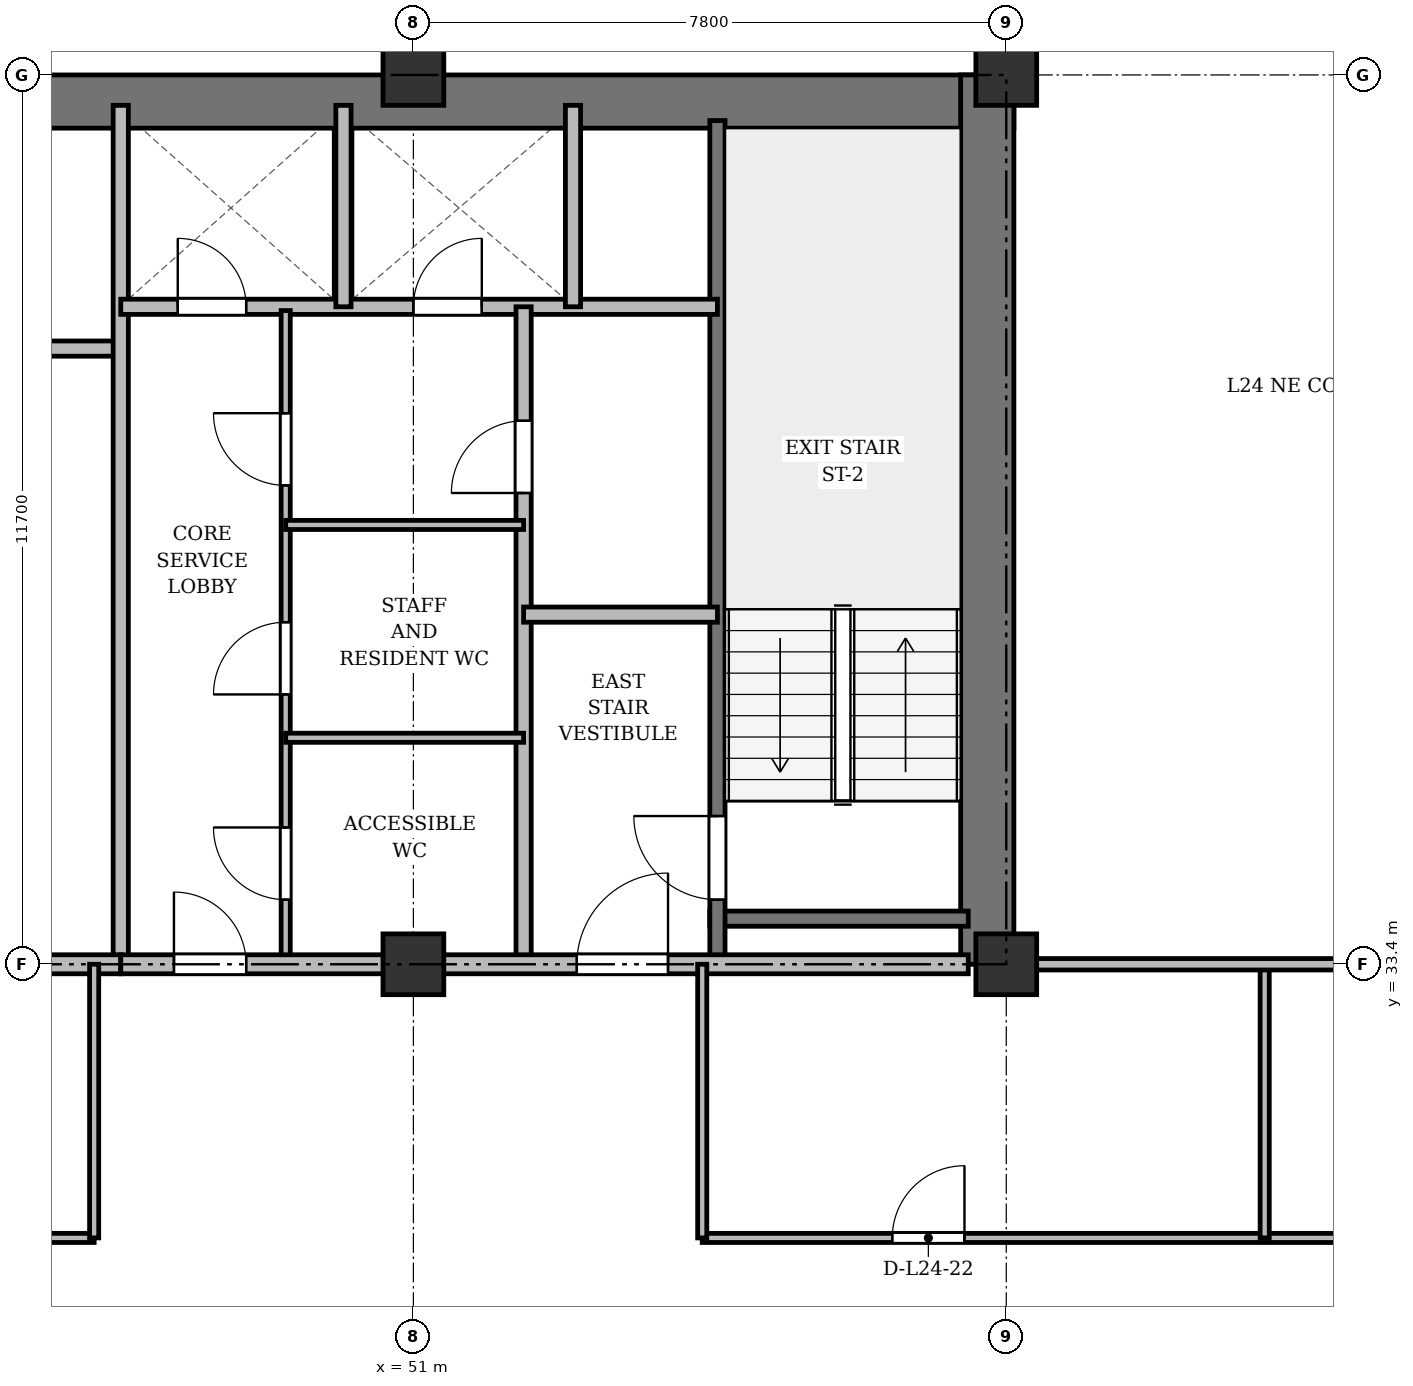
"""IFC4 building model, lengths in metres.
Left out: names, types, materials, properties, quantities, classifications, styles, units other than length and angle.
Written with IfcOpenShell. Run it as: python <this file> out.ifc"""

import sys

from ifc_helpers import new_model, si_unit, direction, frame, frame_2d, origin, origin_2d, place, context, subcontext, project, spatial, rectangle, extrude, source, transform, mapped, element, fill, save


model = new_model("IFC4")
c1 = context("Model", 3, precision=1e-05, world=origin(), true_north=direction((0.0, 1.0)))
c2 = subcontext(c1, "Body", "Model", "MODEL_VIEW")
j1 = project(units=[si_unit("LENGTHUNIT", "METRE"), si_unit("PLANEANGLEUNIT", "RADIAN")], contexts=[c1])
p1 = place(None, origin())
s1 = spatial("IfcSite", under=j1, at=p1, CompositionType="ELEMENT")
p2 = place(p1, origin())
s2 = spatial("IfcBuilding", under=s1, at=p2, CompositionType="ELEMENT")
p3 = place(p2, frame((0.0, 0.0, 96.1)))
s3 = spatial("IfcBuildingStorey", under=s2, at=p3, CompositionType="ELEMENT", Elevation=96.1)
m1 = source(origin(), c2, "Body", "SweptSolid", [
    extrude(rectangle(XDim=0.8, YDim=0.8, at=origin_2d()), origin(), (0.0, 0.0, 1.0), 3.6),
])
for number, where, z_axis, x_axis in (
    (1, (51.0, 33.4, 0.0), (0.0, 0.0, 1.0), (1.0, 0.0, 0.0)),
    (2, (51.0, 45.1, 0.0), (0.0, 0.0, 1.0), (1.0, 0.0, 0.0)),
    (3, (58.8, 33.4, 0.0), (0.0, 0.0, 1.0), (1.0, 0.0, 0.0)),
    (4, (58.8, 45.1, 0.0), (0.0, 0.0, 1.0), (1.0, 0.0, 0.0)),
):
    element("IfcColumn", number, at=place(p3, frame(where, z_axis=z_axis, x_axis=x_axis)), inside=s3, PredefinedType="COLUMN", context=c2, shape_type="MappedRepresentation", body=[
        mapped(m1, transform((0.0, 0.0, 0.0), x_axis=(1.0, 0.0, 0.0), y_axis=(0.0, 1.0, 0.0), z_axis=(0.0, 0.0, 1.0), scale=1.0)),
    ])
p4 = place(p3, frame((15.5, 44.75, 0.0), z_axis=(0.0, 0.0, 1.0), x_axis=(1.0, 0.0, 0.0)))
e5 = element("IfcWall", 5, at=p4, inside=s3, PredefinedType="SHEAR", context=c2, shape_type="SweptSolid", body=[
    extrude(rectangle(XDim=43.4, YDim=0.7, at=frame_2d((21.7, 0.0))), origin(), (0.0, 0.0, 1.0), 3.34),
])
p5 = place(p3, frame((58.55, 33.4, 0.0), z_axis=(0.0, 0.0, 1.0), x_axis=(0.0, 1.0, 0.0)))
e6 = element("IfcWall", 6, at=p5, inside=s3, PredefinedType="SHEAR", context=c2, shape_type="SweptSolid", body=[
    extrude(rectangle(XDim=11.7, YDim=0.7, at=frame_2d((5.85, 0.0))), origin(), (0.0, 0.0, 1.0), 3.34),
])
p6 = place(p3, frame((54.9, 34.0, 0.0), z_axis=(0.0, 0.0, 1.0), x_axis=(1.0, 0.0, 0.0)))
e7 = element("IfcWall", 7, at=p6, inside=s3, PredefinedType="SHEAR", context=c2, shape_type="SweptSolid", body=[
    extrude(rectangle(XDim=3.4, YDim=0.2, at=frame_2d((1.7, 0.0))), origin(), (0.0, 0.0, 1.0), 3.34),
])
p7 = place(p3, frame((55.0, 33.4, 0.0), z_axis=(0.0, 0.0, 1.0), x_axis=(0.0, 1.0, 0.0)))
e8 = element("IfcWall", 8, at=p7, inside=s3, PredefinedType="SHEAR", context=c2, shape_type="SweptSolid", body=[
    extrude(rectangle(XDim=11.1, YDim=0.2, at=frame_2d((5.55, 0.0))), origin(), (0.0, 0.0, 1.0), 3.34),
])
p8 = place(p7, frame((0.85, 0.0, 0.0)))
e9 = element("IfcOpeningElement", 9, at=p8, cuts=e8, PredefinedType="OPENING", context=c2, shape_type="SweptSolid", body=[
    extrude(rectangle(XDim=1.1, YDim=2.15, at=frame_2d((0.55, 1.075))), frame((0.0, 0.11, 0.0), z_axis=(0.0, -1.0, 0.0), x_axis=(1.0, 0.0, 0.0)), (0.0, 0.0, 1.0), 0.22),
])
p9 = place(p3, frame((40.25, 41.5, 0.0), z_axis=(0.0, 0.0, 1.0), x_axis=(1.0, 0.0, 0.0)))
e10 = element("IfcWall", 10, at=p9, inside=s3, PredefinedType="SOLIDWALL", context=c2, shape_type="SweptSolid", body=[
    extrude(rectangle(XDim=6.9, YDim=0.2, at=frame_2d((3.45, 0.0))), origin(), (0.0, 0.0, 1.0), 2.84),
])
p10 = place(p3, frame((47.15, 33.4, 0.0), z_axis=(0.0, 0.0, 1.0), x_axis=(0.0, 1.0, 0.0)))
e11 = element("IfcWall", 11, at=p10, inside=s3, PredefinedType="SOLIDWALL", context=c2, shape_type="SweptSolid", body=[
    extrude(rectangle(XDim=11.3, YDim=0.2, at=frame_2d((5.65, 0.0))), origin(), (0.0, 0.0, 1.0), 2.752),
])
p11 = place(p3, frame((26.3, 33.4, 0.0), z_axis=(0.0, 0.0, 1.0), x_axis=(1.0, 0.0, 0.0)))
e12 = element("IfcWall", 12, at=p11, inside=s3, PredefinedType="PARTITIONING", context=c2, shape_type="SweptSolid", body=[
    extrude(rectangle(XDim=20.85, YDim=0.25, at=frame_2d((10.425, 0.0))), origin(), (0.0, 0.0, 1.0), 2.752),
])
p12 = place(p11, frame((9.2, 0.0, 0.0)))
e13 = element("IfcOpeningElement", 13, at=p12, cuts=e12, PredefinedType="OPENING", context=c2, shape_type="SweptSolid", body=[
    extrude(rectangle(XDim=1.6, YDim=2.2, at=frame_2d((0.8, 1.1))), frame((0.0, 0.135, 0.0), z_axis=(0.0, -1.0, 0.0), x_axis=(1.0, 0.0, 0.0)), (0.0, 0.0, 1.0), 0.27),
])
p13 = place(p3, frame((47.15, 42.05, 0.0), z_axis=(0.0, 0.0, 1.0), x_axis=(1.0, 0.0, 0.0)))
e14 = element("IfcWall", 14, at=p13, inside=s3, PredefinedType="SOLIDWALL", context=c2, shape_type="SweptSolid", body=[
    extrude(rectangle(XDim=7.85, YDim=0.2, at=frame_2d((3.925, 0.0))), origin(), (0.0, 0.0, 1.0), 2.84),
])
p14 = place(p13, frame((0.75, 0.0, 0.0)))
e15 = element("IfcOpeningElement", 15, at=p14, cuts=e14, PredefinedType="OPENING", context=c2, shape_type="SweptSolid", body=[
    extrude(rectangle(XDim=0.9, YDim=2.1, at=frame_2d((0.45, 1.05))), frame((0.0, 0.11, 0.0), z_axis=(0.0, -1.0, 0.0), x_axis=(1.0, 0.0, 0.0)), (0.0, 0.0, 1.0), 0.22),
])
p15 = place(p13, frame((3.85, 0.0, 0.0)))
e16 = element("IfcOpeningElement", 16, at=p15, cuts=e14, PredefinedType="OPENING", context=c2, shape_type="SweptSolid", body=[
    extrude(rectangle(XDim=0.9, YDim=2.1, at=frame_2d((0.45, 1.05))), frame((0.0, 0.11, 0.0), z_axis=(0.0, -1.0, 0.0), x_axis=(1.0, 0.0, 0.0)), (0.0, 0.0, 1.0), 0.22),
])
for number, where, z_axis, x_axis in (
    (17, (50.08, 42.05, 0.0), (0.0, 0.0, 1.0), (0.0, 1.0, 0.0)),
    (18, (53.1, 42.05, 0.0), (0.0, 0.0, 1.0), (0.0, 1.0, 0.0)),
):
    element("IfcWall", number, at=place(p3, frame(where, z_axis=z_axis, x_axis=x_axis)), inside=s3, PredefinedType="SOLIDWALL", context=c2, shape_type="SweptSolid", body=[
        extrude(rectangle(XDim=2.65, YDim=0.2, at=frame_2d((1.325, 0.0))), origin(), (0.0, 0.0, 1.0), 3.34),
    ])
p16 = place(p3, frame((52.45, 33.4, 0.0), z_axis=(0.0, 0.0, 1.0), x_axis=(0.0, 1.0, 0.0)))
e19 = element("IfcWall", 19, at=p16, inside=s3, PredefinedType="PARTITIONING", context=c2, shape_type="SweptSolid", body=[
    extrude(rectangle(XDim=8.65, YDim=0.2, at=frame_2d((4.325, 0.0))), origin(), (0.0, 0.0, 1.0), 2.752),
])
p17 = place(p16, frame((6.2, 0.0, 0.0)))
e20 = element("IfcOpeningElement", 20, at=p17, cuts=e19, PredefinedType="OPENING", context=c2, shape_type="SweptSolid", body=[
    extrude(rectangle(XDim=0.95, YDim=2.15, at=frame_2d((0.475, 1.075))), frame((0.0, 0.11, 0.0), z_axis=(0.0, -1.0, 0.0), x_axis=(1.0, 0.0, 0.0)), (0.0, 0.0, 1.0), 0.22),
])
p18 = place(p3, frame((52.45, 38.0, 0.0), z_axis=(0.0, 0.0, 1.0), x_axis=(1.0, 0.0, 0.0)))
e21 = element("IfcWall", 21, at=p18, inside=s3, PredefinedType="PARTITIONING", context=c2, shape_type="SweptSolid", body=[
    extrude(rectangle(XDim=2.55, YDim=0.2, at=frame_2d((1.275, 0.0))), origin(), (0.0, 0.0, 1.0), 3.34),
])
p19 = place(p3, frame((49.32, 33.4, 0.0), z_axis=(0.0, 0.0, 1.0), x_axis=(0.0, 1.0, 0.0)))
e22 = element("IfcWall", 22, at=p19, inside=s3, PredefinedType="PARTITIONING", context=c2, shape_type="SweptSolid", body=[
    extrude(rectangle(XDim=8.6, YDim=0.12, at=frame_2d((4.3, 0.0))), origin(), (0.0, 0.0, 1.0), 2.752),
])
p20 = place(p19, frame((0.85, 0.0, 0.0)))
e23 = element("IfcOpeningElement", 23, at=p20, cuts=e22, PredefinedType="OPENING", context=c2, shape_type="SweptSolid", body=[
    extrude(rectangle(XDim=0.95, YDim=2.15, at=frame_2d((0.475, 1.075))), frame((0.0, 0.07, 0.0), z_axis=(0.0, -1.0, 0.0), x_axis=(1.0, 0.0, 0.0)), (0.0, 0.0, 1.0), 0.14),
])
p21 = place(p19, frame((3.55, 0.0, 0.0)))
e24 = element("IfcOpeningElement", 24, at=p21, cuts=e22, PredefinedType="OPENING", context=c2, shape_type="SweptSolid", body=[
    extrude(rectangle(XDim=0.95, YDim=2.15, at=frame_2d((0.475, 1.075))), frame((0.0, 0.07, 0.0), z_axis=(0.0, -1.0, 0.0), x_axis=(1.0, 0.0, 0.0)), (0.0, 0.0, 1.0), 0.14),
])
p22 = place(p19, frame((6.3, 0.0, 0.0)))
e25 = element("IfcOpeningElement", 25, at=p22, cuts=e22, PredefinedType="OPENING", context=c2, shape_type="SweptSolid", body=[
    extrude(rectangle(XDim=0.95, YDim=2.15, at=frame_2d((0.475, 1.075))), frame((0.0, 0.07, 0.0), z_axis=(0.0, -1.0, 0.0), x_axis=(1.0, 0.0, 0.0)), (0.0, 0.0, 1.0), 0.14),
])
for number, where, z_axis, x_axis in (
    (26, (49.32, 36.38, 0.0), (0.0, 0.0, 1.0), (1.0, 0.0, 0.0)),
    (27, (49.32, 39.18, 0.0), (0.0, 0.0, 1.0), (1.0, 0.0, 0.0)),
):
    element("IfcWall", number, at=place(p3, frame(where, z_axis=z_axis, x_axis=x_axis)), inside=s3, PredefinedType="PARTITIONING", context=c2, shape_type="SweptSolid", body=[
        extrude(rectangle(XDim=3.13, YDim=0.12, at=frame_2d((1.565, 0.0))), origin(), (0.0, 0.0, 1.0), 2.84),
    ])
p23 = place(p3, frame((47.15, 33.4, 0.0), z_axis=(0.0, 0.0, 1.0), x_axis=(1.0, 0.0, 0.0)))
e28 = element("IfcWall", 28, at=p23, inside=s3, PredefinedType="PARTITIONING", context=c2, shape_type="SweptSolid", body=[
    extrude(rectangle(XDim=11.15, YDim=0.25, at=frame_2d((5.575, 0.0))), origin(), (0.0, 0.0, 1.0), 2.752),
])
p24 = place(p23, frame((0.7, 0.0, 0.0)))
e29 = element("IfcOpeningElement", 29, at=p24, cuts=e28, PredefinedType="OPENING", context=c2, shape_type="SweptSolid", body=[
    extrude(rectangle(XDim=0.95, YDim=2.15, at=frame_2d((0.475, 1.075))), frame((0.0, 0.135, 0.0), z_axis=(0.0, -1.0, 0.0), x_axis=(1.0, 0.0, 0.0)), (0.0, 0.0, 1.0), 0.27),
])
p25 = place(p23, frame((6.0, 0.0, 0.0)))
e30 = element("IfcOpeningElement", 30, at=p25, cuts=e28, PredefinedType="OPENING", context=c2, shape_type="SweptSolid", body=[
    extrude(rectangle(XDim=1.2, YDim=2.15, at=frame_2d((0.6, 1.075))), frame((0.0, 0.135, 0.0), z_axis=(0.0, -1.0, 0.0), x_axis=(1.0, 0.0, 0.0)), (0.0, 0.0, 1.0), 0.27),
])
p26 = place(p3, frame((38.2, 29.8, 0.0), z_axis=(0.0, 0.0, 1.0), x_axis=(1.0, 0.0, 0.0)))
e31 = element("IfcWall", 31, at=p26, inside=s3, PredefinedType="PARTITIONING", context=c2, shape_type="SweptSolid", body=[
    extrude(rectangle(XDim=8.6, YDim=0.12, at=frame_2d((4.3, 0.0))), origin(), (0.0, 0.0, 1.0), 2.84),
])
p27 = place(p26, frame((3.462, 0.0, 0.0)))
e32 = element("IfcOpeningElement", 32, at=p27, cuts=e31, PredefinedType="OPENING", context=c2, shape_type="SweptSolid", body=[
    extrude(rectangle(XDim=0.95, YDim=2.15, at=frame_2d((0.475, 1.075))), frame((0.0, 0.07, 0.0), z_axis=(0.0, -1.0, 0.0), x_axis=(1.0, 0.0, 0.0)), (0.0, 0.0, 1.0), 0.14),
])
p28 = place(p3, frame((54.8, 29.8, 0.0), z_axis=(0.0, 0.0, 1.0), x_axis=(1.0, 0.0, 0.0)))
e33 = element("IfcWall", 33, at=p28, inside=s3, PredefinedType="PARTITIONING", context=c2, shape_type="SweptSolid", body=[
    extrude(rectangle(XDim=14.85, YDim=0.12, at=frame_2d((7.425, 0.0))), origin(), (0.0, 0.0, 1.0), 2.84),
])
p29 = place(p28, frame((2.5, 0.0, 0.0)))
e34 = element("IfcOpeningElement", 34, at=p29, cuts=e33, PredefinedType="OPENING", context=c2, shape_type="SweptSolid", body=[
    extrude(rectangle(XDim=0.95, YDim=2.15, at=frame_2d((0.475, 1.075))), frame((0.0, 0.07, 0.0), z_axis=(0.0, -1.0, 0.0), x_axis=(1.0, 0.0, 0.0)), (0.0, 0.0, 1.0), 0.14),
])
p30 = place(p28, frame((9.2, 0.0, 0.0)))
e35 = element("IfcOpeningElement", 35, at=p30, cuts=e33, PredefinedType="OPENING", context=c2, shape_type="SweptSolid", body=[
    extrude(rectangle(XDim=0.95, YDim=2.15, at=frame_2d((0.475, 1.075))), frame((0.0, 0.07, 0.0), z_axis=(0.0, -1.0, 0.0), x_axis=(1.0, 0.0, 0.0)), (0.0, 0.0, 1.0), 0.14),
])
for number, where, z_axis, x_axis in (
    (36, (62.2, 29.8, 0.0), (0.0, 0.0, 1.0), (0.0, 1.0, 0.0)),
    (37, (46.8, 29.8, 0.0), (0.0, 0.0, 1.0), (0.0, 1.0, 0.0)),
    (38, (54.8, 29.8, 0.0), (0.0, 0.0, 1.0), (0.0, 1.0, 0.0)),
):
    element("IfcWall", number, at=place(p3, frame(where, z_axis=z_axis, x_axis=x_axis)), inside=s3, PredefinedType="PARTITIONING", context=c2, shape_type="SweptSolid", body=[
        extrude(rectangle(XDim=3.6, YDim=0.12, at=frame_2d((1.8, 0.0))), origin(), (0.0, 0.0, 1.0), 2.752),
    ])
p31 = place(p3, frame((58.8, 33.4, 0.0), z_axis=(0.0, 0.0, 1.0), x_axis=(1.0, 0.0, 0.0)))
e39 = element("IfcWall", 39, at=p31, inside=s3, PredefinedType="PARTITIONING", context=c2, shape_type="SweptSolid", body=[
    extrude(rectangle(XDim=10.85, YDim=0.15, at=frame_2d((5.425, 0.0))), origin(), (0.0, 0.0, 1.0), 2.752),
])
p32 = place(p31, frame((4.76, 0.0, 0.0)))
e40 = element("IfcOpeningElement", 40, at=p32, cuts=e39, PredefinedType="OPENING", context=c2, shape_type="SweptSolid", body=[
    extrude(rectangle(XDim=0.95, YDim=2.15, at=frame_2d((0.475, 1.075))), frame((0.0, 0.085, 0.0), z_axis=(0.0, -1.0, 0.0), x_axis=(1.0, 0.0, 0.0)), (0.0, 0.0, 1.0), 0.17),
])
p33 = place(p3, frame((58.8, 44.75, 0.0), z_axis=(0.0, 0.0, 1.0), x_axis=(0.0, 1.0, 0.0)))
e41 = element("IfcWall", 41, at=p33, inside=s3, PredefinedType="PARTITIONING", context=c2, shape_type="SweptSolid", body=[
    extrude(rectangle(XDim=3.61, YDim=0.15, at=frame_2d((1.805, 0.0))), origin(), (0.0, 0.0, 1.0), 2.84),
])
p34 = place(p33, frame((1.1, 0.0, 0.0)))
e42 = element("IfcOpeningElement", 42, at=p34, cuts=e41, PredefinedType="OPENING", context=c2, shape_type="SweptSolid", body=[
    extrude(rectangle(XDim=0.95, YDim=2.15, at=frame_2d((0.475, 1.075))), frame((0.0, 0.085, 0.0), z_axis=(0.0, -1.0, 0.0), x_axis=(1.0, 0.0, 0.0)), (0.0, 0.0, 1.0), 0.17),
])
m2 = source(origin(), c2, "Body", "SweptSolid", [
    extrude(rectangle(XDim=1.1, YDim=2.15, at=frame_2d((0.55, 1.075))), frame((0.0, 0.025, 0.0), z_axis=(0.0, -1.0, 0.0), x_axis=(1.0, 0.0, 0.0)), (0.0, 0.0, 1.0), 0.05),
])
p35 = place(p8, origin())
e43 = element("IfcDoor", 43, at=p35, inside=s3, OperationType="SINGLE_SWING_RIGHT", PredefinedType="DOOR", context=c2, shape_type="MappedRepresentation", body=[
    mapped(m2, transform((0.0, 0.0, 0.0), x_axis=(1.0, 0.0, 0.0), y_axis=(0.0, 1.0, 0.0), z_axis=(0.0, 0.0, 1.0), scale=1.0)),
])
fill(e9, e43)
m3 = source(origin(), c2, "Body", "SweptSolid", [
    extrude(rectangle(XDim=0.9, YDim=2.1, at=frame_2d((0.45, 1.05))), frame((0.0, 0.025, 0.0), z_axis=(0.0, -1.0, 0.0), x_axis=(1.0, 0.0, 0.0)), (0.0, 0.0, 1.0), 0.05),
])
p36 = place(p14, origin())
e44 = element("IfcDoor", 44, at=p36, inside=s3, OperationType="SINGLE_SWING_LEFT", PredefinedType="DOOR", context=c2, shape_type="MappedRepresentation", body=[
    mapped(m3, transform((0.0, 0.0, 0.0), x_axis=(1.0, 0.0, 0.0), y_axis=(0.0, 1.0, 0.0), z_axis=(0.0, 0.0, 1.0), scale=1.0)),
])
fill(e15, e44)
p37 = place(p15, origin())
e45 = element("IfcDoor", 45, at=p37, inside=s3, OperationType="SINGLE_SWING_RIGHT", PredefinedType="DOOR", context=c2, shape_type="MappedRepresentation", body=[
    mapped(m3, transform((0.0, 0.0, 0.0), x_axis=(1.0, 0.0, 0.0), y_axis=(0.0, 1.0, 0.0), z_axis=(0.0, 0.0, 1.0), scale=1.0)),
])
fill(e16, e45)
m4 = source(origin(), c2, "Body", "SweptSolid", [
    extrude(rectangle(XDim=0.95, YDim=2.15, at=frame_2d((0.475, 1.075))), frame((0.0, 0.025, 0.0), z_axis=(0.0, -1.0, 0.0), x_axis=(1.0, 0.0, 0.0)), (0.0, 0.0, 1.0), 0.05),
])
p38 = place(p17, origin())
e46 = element("IfcDoor", 46, at=p38, inside=s3, OperationType="SINGLE_SWING_LEFT", PredefinedType="DOOR", context=c2, shape_type="MappedRepresentation", body=[
    mapped(m4, transform((0.0, 0.0, 0.0), x_axis=(1.0, 0.0, 0.0), y_axis=(0.0, 1.0, 0.0), z_axis=(0.0, 0.0, 1.0), scale=1.0)),
])
fill(e20, e46)
p39 = place(p20, origin())
e47 = element("IfcDoor", 47, at=p39, inside=s3, OperationType="SINGLE_SWING_RIGHT", PredefinedType="DOOR", context=c2, shape_type="MappedRepresentation", body=[
    mapped(m4, transform((0.0, 0.0, 0.0), x_axis=(1.0, 0.0, 0.0), y_axis=(0.0, 1.0, 0.0), z_axis=(0.0, 0.0, 1.0), scale=1.0)),
])
fill(e23, e47)
p40 = place(p21, origin())
e48 = element("IfcDoor", 48, at=p40, inside=s3, OperationType="SINGLE_SWING_LEFT", PredefinedType="DOOR", context=c2, shape_type="MappedRepresentation", body=[
    mapped(m4, transform((0.0, 0.0, 0.0), x_axis=(1.0, 0.0, 0.0), y_axis=(0.0, 1.0, 0.0), z_axis=(0.0, 0.0, 1.0), scale=1.0)),
])
fill(e24, e48)
p41 = place(p22, origin())
e49 = element("IfcDoor", 49, at=p41, inside=s3, OperationType="SINGLE_SWING_RIGHT", PredefinedType="DOOR", context=c2, shape_type="MappedRepresentation", body=[
    mapped(m4, transform((0.0, 0.0, 0.0), x_axis=(1.0, 0.0, 0.0), y_axis=(0.0, 1.0, 0.0), z_axis=(0.0, 0.0, 1.0), scale=1.0)),
])
fill(e25, e49)
p42 = place(p24, origin())
e50 = element("IfcDoor", 50, at=p42, inside=s3, OperationType="SINGLE_SWING_LEFT", PredefinedType="DOOR", context=c2, shape_type="MappedRepresentation", body=[
    mapped(m4, transform((0.0, 0.0, 0.0), x_axis=(1.0, 0.0, 0.0), y_axis=(0.0, 1.0, 0.0), z_axis=(0.0, 0.0, 1.0), scale=1.0)),
])
fill(e29, e50)
m5 = source(origin(), c2, "Body", "SweptSolid", [
    extrude(rectangle(XDim=1.2, YDim=2.15, at=frame_2d((0.6, 1.075))), frame((0.0, 0.025, 0.0), z_axis=(0.0, -1.0, 0.0), x_axis=(1.0, 0.0, 0.0)), (0.0, 0.0, 1.0), 0.05),
])
p43 = place(p25, origin())
e51 = element("IfcDoor", 51, at=p43, inside=s3, OperationType="SINGLE_SWING_RIGHT", PredefinedType="DOOR", context=c2, shape_type="MappedRepresentation", body=[
    mapped(m5, transform((0.0, 0.0, 0.0), x_axis=(1.0, 0.0, 0.0), y_axis=(0.0, 1.0, 0.0), z_axis=(0.0, 0.0, 1.0), scale=1.0)),
])
fill(e30, e51)
p44 = place(p29, origin())
e52 = element("IfcDoor", 52, at=p44, inside=s3, OperationType="SINGLE_SWING_RIGHT", PredefinedType="DOOR", context=c2, shape_type="MappedRepresentation", body=[
    mapped(m4, transform((0.0, 0.0, 0.0), x_axis=(1.0, 0.0, 0.0), y_axis=(0.0, 1.0, 0.0), z_axis=(0.0, 0.0, 1.0), scale=1.0)),
])
fill(e34, e52)
save(model, sys.argv[1])
